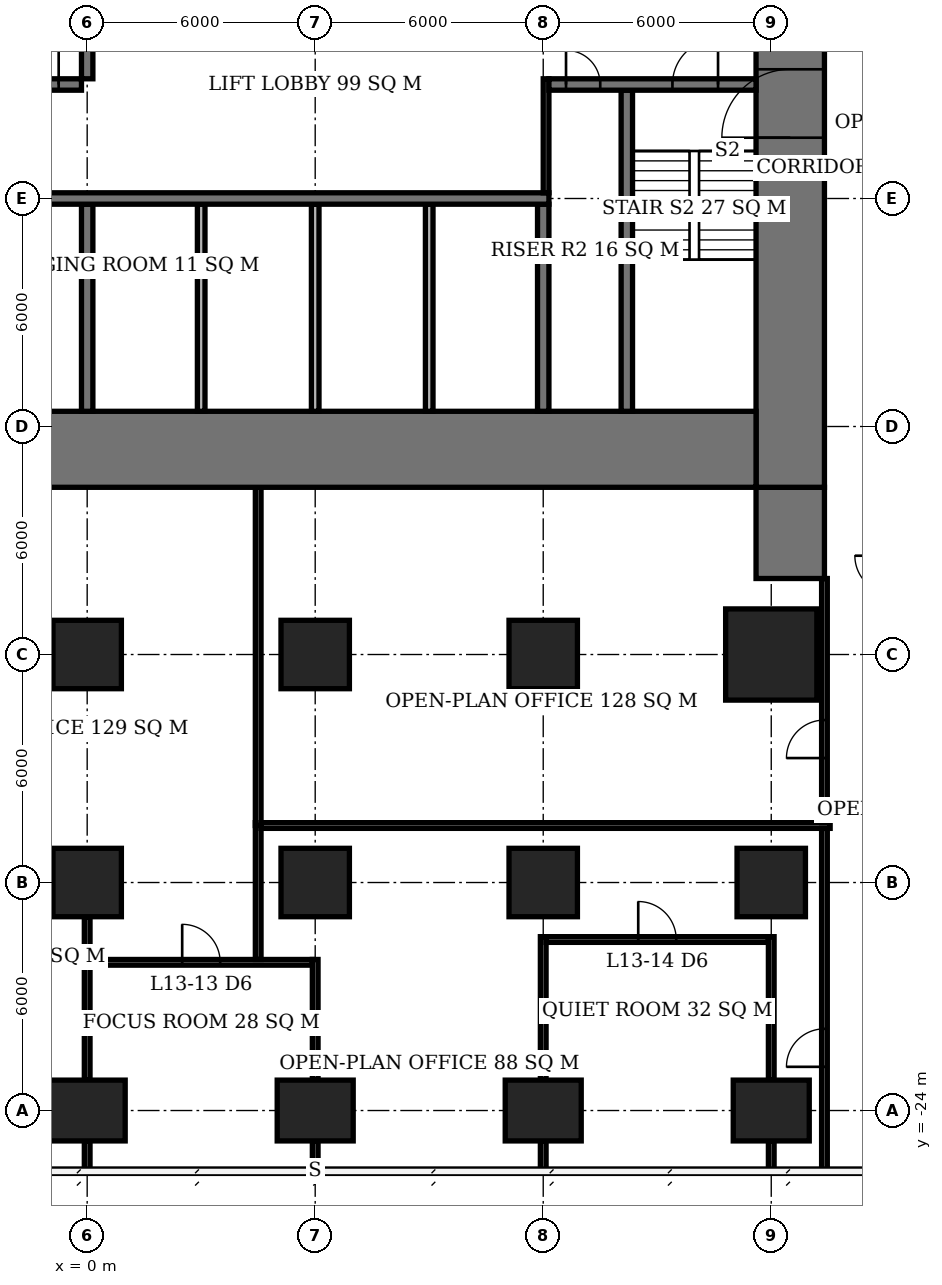
"""IFC4 building model, lengths in metres.
Left out: names, types, materials, properties, quantities, classifications, styles, units other than length and angle.
Written with IfcOpenShell. Run it as: python <this file> out.ifc"""

import sys

from ifc_helpers import new_model, si_unit, direction, frame, frame_2d, origin, origin_2d, place, context, subcontext, project, spatial, rectangle, extrude, element, fill, save


model = new_model("IFC4")
c1 = context("Model", 3, precision=1e-05, world=origin(), true_north=direction((0.0, 1.0)))
c2 = subcontext(c1, "Body", "Model", "MODEL_VIEW")
j1 = project(units=[si_unit("LENGTHUNIT", "METRE"), si_unit("PLANEANGLEUNIT", "RADIAN")], contexts=[c1])
p1 = place(None, origin())
s1 = spatial("IfcSite", under=j1, at=p1, CompositionType="ELEMENT")
p2 = place(p1, origin())
s2 = spatial("IfcBuilding", under=s1, at=p2, CompositionType="ELEMENT")
p3 = place(p2, frame((0.0, 0.0, 57.2)))
s3 = spatial("IfcBuildingStorey", under=s2, at=p3, CompositionType="ELEMENT", Elevation=57.2)
p4 = place(p3, frame((0.0, -24.0, 0.0), z_axis=(0.0, 0.0, 1.0), x_axis=(1.0, 0.0, 0.0)))
e1 = element("IfcColumn", 1, at=p4, inside=s3, PredefinedType="COLUMN", context=c2, shape_type="SweptSolid", body=[
    extrude(rectangle(XDim=2.0, YDim=1.6, at=origin_2d()), origin(), (0.0, 0.0, 1.0), 3.9),
])
for number, where, z_axis, x_axis in (
    (2, (0.0, -18.0, 0.0), (0.0, 0.0, 1.0), (1.0, 0.0, 0.0)),
    (3, (0.0, -12.0, 0.0), (0.0, 0.0, 1.0), (1.0, 0.0, 0.0)),
):
    element("IfcColumn", number, at=place(p3, frame(where, z_axis=z_axis, x_axis=x_axis)), inside=s3, PredefinedType="COLUMN", context=c2, shape_type="SweptSolid", body=[
        extrude(rectangle(XDim=1.8, YDim=1.8, at=origin_2d()), origin(), (0.0, 0.0, 1.0), 3.9),
    ])
p5 = place(p3, frame((6.0, -24.0, 0.0), z_axis=(0.0, 0.0, 1.0), x_axis=(1.0, 0.0, 0.0)))
e4 = element("IfcColumn", 4, at=p5, inside=s3, PredefinedType="COLUMN", context=c2, shape_type="SweptSolid", body=[
    extrude(rectangle(XDim=2.0, YDim=1.6, at=origin_2d()), origin(), (0.0, 0.0, 1.0), 3.9),
])
for number, where, z_axis, x_axis in (
    (5, (6.0, -18.0, 0.0), (0.0, 0.0, 1.0), (1.0, 0.0, 0.0)),
    (6, (6.0, -12.0, 0.0), (0.0, 0.0, 1.0), (1.0, 0.0, 0.0)),
):
    element("IfcColumn", number, at=place(p3, frame(where, z_axis=z_axis, x_axis=x_axis)), inside=s3, PredefinedType="COLUMN", context=c2, shape_type="SweptSolid", body=[
        extrude(rectangle(XDim=1.8, YDim=1.8, at=origin_2d()), origin(), (0.0, 0.0, 1.0), 3.9),
    ])
p6 = place(p3, frame((12.0, -24.0, 0.0), z_axis=(0.0, 0.0, 1.0), x_axis=(1.0, 0.0, 0.0)))
e7 = element("IfcColumn", 7, at=p6, inside=s3, PredefinedType="COLUMN", context=c2, shape_type="SweptSolid", body=[
    extrude(rectangle(XDim=2.0, YDim=1.6, at=origin_2d()), origin(), (0.0, 0.0, 1.0), 3.9),
])
for number, where, z_axis, x_axis in (
    (8, (12.0, -18.0, 0.0), (0.0, 0.0, 1.0), (1.0, 0.0, 0.0)),
    (9, (12.0, -12.0, 0.0), (0.0, 0.0, 1.0), (1.0, 0.0, 0.0)),
):
    element("IfcColumn", number, at=place(p3, frame(where, z_axis=z_axis, x_axis=x_axis)), inside=s3, PredefinedType="COLUMN", context=c2, shape_type="SweptSolid", body=[
        extrude(rectangle(XDim=1.8, YDim=1.8, at=origin_2d()), origin(), (0.0, 0.0, 1.0), 3.9),
    ])
p7 = place(p3, frame((18.0, -24.0, 0.0), z_axis=(0.0, 0.0, 1.0), x_axis=(1.0, 0.0, 0.0)))
e10 = element("IfcColumn", 10, at=p7, inside=s3, PredefinedType="COLUMN", context=c2, shape_type="SweptSolid", body=[
    extrude(rectangle(XDim=2.0, YDim=1.6, at=origin_2d()), origin(), (0.0, 0.0, 1.0), 3.9),
])
p8 = place(p3, frame((18.0, -18.0, 0.0), z_axis=(0.0, 0.0, 1.0), x_axis=(1.0, 0.0, 0.0)))
e11 = element("IfcColumn", 11, at=p8, inside=s3, PredefinedType="COLUMN", context=c2, shape_type="SweptSolid", body=[
    extrude(rectangle(XDim=1.8, YDim=1.8, at=origin_2d()), origin(), (0.0, 0.0, 1.0), 3.9),
])
p9 = place(p3, frame((18.0, -12.0, 0.0), z_axis=(0.0, 0.0, 1.0), x_axis=(1.0, 0.0, 0.0)))
e12 = element("IfcColumn", 12, at=p9, inside=s3, PredefinedType="COLUMN", context=c2, shape_type="SweptSolid", body=[
    extrude(rectangle(XDim=2.4, YDim=2.4, at=origin_2d()), origin(), (0.0, 0.0, 1.0), 3.9),
])
p10 = place(p3, frame((-5.6, -6.6, 0.0), z_axis=(0.0, 0.0, 1.0), x_axis=(1.0, 0.0, 0.0)))
e13 = element("IfcWall", 13, at=p10, inside=s3, PredefinedType="SHEAR", context=c2, shape_type="SweptSolid", body=[
    extrude(rectangle(XDim=23.2, YDim=2.0, at=frame_2d((11.6, 0.0))), origin(), (0.0, 0.0, 1.0), 3.9),
])
p11 = place(p3, frame((18.5, -7.6, 0.0), z_axis=(0.0, 0.0, 1.0), x_axis=(0.0, 1.0, 0.0)))
e14 = element("IfcWall", 14, at=p11, inside=s3, PredefinedType="SHEAR", context=c2, shape_type="SweptSolid", body=[
    extrude(rectangle(XDim=21.2, YDim=1.8, at=frame_2d((10.6, 0.0))), origin(), (0.0, 0.0, 1.0), 3.9),
])
p12 = place(p11, frame((9.2, 0.0, 0.0)))
e15 = element("IfcOpeningElement", 15, at=p12, cuts=e14, PredefinedType="OPENING", context=c2, shape_type="SweptSolid", body=[
    extrude(rectangle(XDim=1.8, YDim=2.4, at=frame_2d((0.9, 1.2))), frame((0.0, 0.91, 0.0), z_axis=(0.0, -1.0, 0.0), x_axis=(1.0, 0.0, 0.0)), (0.0, 0.0, 1.0), 1.82),
])
p13 = place(p3, frame((18.5, -10.0, 0.0), z_axis=(0.0, 0.0, 1.0), x_axis=(0.0, 1.0, 0.0)))
e16 = element("IfcWall", 16, at=p13, inside=s3, PredefinedType="SHEAR", context=c2, shape_type="SweptSolid", body=[
    extrude(rectangle(XDim=2.4, YDim=1.8, at=frame_2d((1.2, 0.0))), origin(), (0.0, 0.0, 1.0), 3.9),
])
p14 = place(p3, frame((-5.6, 0.0, 0.0), z_axis=(0.0, 0.0, 1.0), x_axis=(1.0, 0.0, 0.0)))
e17 = element("IfcWall", 17, at=p14, inside=s3, PredefinedType="SHEAR", context=c2, shape_type="SweptSolid", body=[
    extrude(rectangle(XDim=17.75, YDim=0.3, at=frame_2d((8.875, 0.0))), origin(), (0.0, 0.0, 1.0), 3.9),
])
p15 = place(p14, frame((0.6, 0.0, 0.0)))
e18 = element("IfcOpeningElement", 18, at=p15, cuts=e17, PredefinedType="OPENING", context=c2, shape_type="SweptSolid", body=[
    extrude(rectangle(XDim=0.9, YDim=2.1, at=frame_2d((0.45, 1.05))), frame((0.0, 0.16, 0.0), z_axis=(0.0, -1.0, 0.0), x_axis=(1.0, 0.0, 0.0)), (0.0, 0.0, 1.0), 0.32),
])
p16 = place(p14, frame((3.7, 0.0, 0.0)))
e19 = element("IfcOpeningElement", 19, at=p16, cuts=e17, PredefinedType="OPENING", context=c2, shape_type="SweptSolid", body=[
    extrude(rectangle(XDim=0.9, YDim=2.1, at=frame_2d((0.45, 1.05))), frame((0.0, 0.16, 0.0), z_axis=(0.0, -1.0, 0.0), x_axis=(1.0, 0.0, 0.0)), (0.0, 0.0, 1.0), 0.32),
])
p17 = place(p3, frame((-5.6, 3.0, 0.0), z_axis=(0.0, 0.0, 1.0), x_axis=(1.0, 0.0, 0.0)))
e20 = element("IfcWall", 20, at=p17, inside=s3, PredefinedType="SHEAR", context=c2, shape_type="SweptSolid", body=[
    extrude(rectangle(XDim=5.45, YDim=0.3, at=frame_2d((2.725, 0.0))), origin(), (0.0, 0.0, 1.0), 3.9),
])
p18 = place(p17, frame((0.4, 0.0, 0.0)))
e21 = element("IfcOpeningElement", 21, at=p18, cuts=e20, PredefinedType="OPENING", context=c2, shape_type="SweptSolid", body=[
    extrude(rectangle(XDim=1.2, YDim=2.1, at=frame_2d((0.6, 1.05))), frame((0.0, 0.16, 0.0), z_axis=(0.0, -1.0, 0.0), x_axis=(1.0, 0.0, 0.0)), (0.0, 0.0, 1.0), 0.32),
])
p19 = place(p17, frame((3.95, 0.0, 0.0)))
e22 = element("IfcOpeningElement", 22, at=p19, cuts=e20, PredefinedType="OPENING", context=c2, shape_type="SweptSolid", body=[
    extrude(rectangle(XDim=0.9, YDim=2.1, at=frame_2d((0.45, 1.05))), frame((0.0, 0.16, 0.0), z_axis=(0.0, -1.0, 0.0), x_axis=(1.0, 0.0, 0.0)), (0.0, 0.0, 1.0), 0.32),
])
p20 = place(p3, frame((12.15, 3.0, 0.0), z_axis=(0.0, 0.0, 1.0), x_axis=(1.0, 0.0, 0.0)))
e23 = element("IfcWall", 23, at=p20, inside=s3, PredefinedType="SHEAR", context=c2, shape_type="SweptSolid", body=[
    extrude(rectangle(XDim=5.45, YDim=0.3, at=frame_2d((2.725, 0.0))), origin(), (0.0, 0.0, 1.0), 3.9),
])
p21 = place(p20, frame((3.25, 0.0, 0.0)))
e24 = element("IfcOpeningElement", 24, at=p21, cuts=e23, PredefinedType="OPENING", context=c2, shape_type="SweptSolid", body=[
    extrude(rectangle(XDim=1.2, YDim=2.1, at=frame_2d((0.6, 1.05))), frame((0.0, 0.16, 0.0), z_axis=(0.0, -1.0, 0.0), x_axis=(1.0, 0.0, 0.0)), (0.0, 0.0, 1.0), 0.32),
])
p22 = place(p20, frame((0.45, 0.0, 0.0)))
e25 = element("IfcOpeningElement", 25, at=p22, cuts=e23, PredefinedType="OPENING", context=c2, shape_type="SweptSolid", body=[
    extrude(rectangle(XDim=0.9, YDim=2.1, at=frame_2d((0.45, 1.05))), frame((0.0, 0.16, 0.0), z_axis=(0.0, -1.0, 0.0), x_axis=(1.0, 0.0, 0.0)), (0.0, 0.0, 1.0), 0.32),
])
p23 = place(p3, frame((0.0, -5.6, 0.0), z_axis=(0.0, 0.0, 1.0), x_axis=(0.0, 1.0, 0.0)))
e26 = element("IfcWall", 26, at=p23, inside=s3, PredefinedType="SHEAR", context=c2, shape_type="SweptSolid", body=[
    extrude(rectangle(XDim=5.45, YDim=0.3, at=frame_2d((2.725, 0.0))), origin(), (0.0, 0.0, 1.0), 3.9),
])
p24 = place(p3, frame((0.0, 3.15, 0.0), z_axis=(0.0, 0.0, 1.0), x_axis=(0.0, 1.0, 0.0)))
e27 = element("IfcWall", 27, at=p24, inside=s3, PredefinedType="SHEAR", context=c2, shape_type="SweptSolid", body=[
    extrude(rectangle(XDim=8.45, YDim=0.3, at=frame_2d((4.225, 0.0))), origin(), (0.0, 0.0, 1.0), 3.9),
])
p25 = place(p3, frame((12.0, -5.6, 0.0), z_axis=(0.0, 0.0, 1.0), x_axis=(0.0, 1.0, 0.0)))
e28 = element("IfcWall", 28, at=p25, inside=s3, PredefinedType="SHEAR", context=c2, shape_type="SweptSolid", body=[
    extrude(rectangle(XDim=5.45, YDim=0.3, at=frame_2d((2.725, 0.0))), origin(), (0.0, 0.0, 1.0), 3.9),
])
p26 = place(p3, frame((14.2, -5.6, 0.0), z_axis=(0.0, 0.0, 1.0), x_axis=(0.0, 1.0, 0.0)))
e29 = element("IfcWall", 29, at=p26, inside=s3, PredefinedType="SHEAR", context=c2, shape_type="SweptSolid", body=[
    extrude(rectangle(XDim=8.45, YDim=0.3, at=frame_2d((4.225, 0.0))), origin(), (0.0, 0.0, 1.0), 3.9),
])
for number, where, z_axis, x_axis in (
    (30, (3.0, -5.6, 0.0), (0.0, 0.0, 1.0), (0.0, 1.0, 0.0)),
    (31, (6.0, -5.6, 0.0), (0.0, 0.0, 1.0), (0.0, 1.0, 0.0)),
    (32, (9.0, -5.6, 0.0), (0.0, 0.0, 1.0), (0.0, 1.0, 0.0)),
):
    element("IfcWall", number, at=place(p3, frame(where, z_axis=z_axis, x_axis=x_axis)), inside=s3, PredefinedType="SOLIDWALL", context=c2, shape_type="SweptSolid", body=[
        extrude(rectangle(XDim=5.45, YDim=0.2, at=frame_2d((2.725, 0.0))), origin(), (0.0, 0.0, 1.0), 3.9),
    ])
p27 = place(p3, frame((0.075, -20.1, 0.0), z_axis=(0.0, 0.0, 1.0), x_axis=(1.0, 0.0, 0.0)))
e33 = element("IfcWall", 33, at=p27, inside=s3, PredefinedType="PARTITIONING", context=c2, shape_type="SweptSolid", body=[
    extrude(rectangle(XDim=5.85, YDim=0.15, at=frame_2d((2.925, 0.0))), origin(), (0.0, 0.0, 1.0), 3.65),
])
p28 = place(p27, frame((2.425, 0.0, 0.0)))
e34 = element("IfcOpeningElement", 34, at=p28, cuts=e33, PredefinedType="OPENING", context=c2, shape_type="SweptSolid", body=[
    extrude(rectangle(XDim=1.0, YDim=2.1, at=frame_2d((0.5, 1.05))), frame((0.0, 0.085, 0.0), z_axis=(0.0, -1.0, 0.0), x_axis=(1.0, 0.0, 0.0)), (0.0, 0.0, 1.0), 0.17),
])
p29 = place(p3, frame((12.075, -19.5, 0.0), z_axis=(0.0, 0.0, 1.0), x_axis=(1.0, 0.0, 0.0)))
e35 = element("IfcWall", 35, at=p29, inside=s3, PredefinedType="PARTITIONING", context=c2, shape_type="SweptSolid", body=[
    extrude(rectangle(XDim=5.85, YDim=0.15, at=frame_2d((2.925, 0.0))), origin(), (0.0, 0.0, 1.0), 3.65),
])
p30 = place(p29, frame((2.425, 0.0, 0.0)))
e36 = element("IfcOpeningElement", 36, at=p30, cuts=e35, PredefinedType="OPENING", context=c2, shape_type="SweptSolid", body=[
    extrude(rectangle(XDim=1.0, YDim=2.1, at=frame_2d((0.5, 1.05))), frame((0.0, 0.085, 0.0), z_axis=(0.0, -1.0, 0.0), x_axis=(1.0, 0.0, 0.0)), (0.0, 0.0, 1.0), 0.17),
])
p31 = place(p3, frame((-5.1, -18.0, 0.0), z_axis=(0.0, 0.0, 1.0), x_axis=(1.0, 0.0, 0.0)))
e37 = element("IfcWall", 37, at=p31, inside=s3, PredefinedType="PARTITIONING", context=c2, shape_type="SweptSolid", body=[
    extrude(rectangle(XDim=4.2, YDim=0.15, at=frame_2d((2.1, 0.0))), origin(), (0.0, 0.0, 1.0), 3.65),
])
p32 = place(p31, frame((1.6, 0.0, 0.0)))
e38 = element("IfcOpeningElement", 38, at=p32, cuts=e37, PredefinedType="OPENING", context=c2, shape_type="SweptSolid", body=[
    extrude(rectangle(XDim=1.0, YDim=2.1, at=frame_2d((0.5, 1.05))), frame((0.0, 0.085, 0.0), z_axis=(0.0, -1.0, 0.0), x_axis=(1.0, 0.0, 0.0)), (0.0, 0.0, 1.0), 0.17),
])
p33 = place(p3, frame((0.0, -25.6, 0.0), z_axis=(0.0, 0.0, 1.0), x_axis=(0.0, 1.0, 0.0)))
e39 = element("IfcWall", 39, at=p33, inside=s3, PredefinedType="PARTITIONING", context=c2, shape_type="SweptSolid", body=[
    extrude(rectangle(XDim=0.8, YDim=0.15, at=frame_2d((0.4, 0.0))), origin(), (0.0, 0.0, 1.0), 3.65),
])
p34 = place(p3, frame((0.0, -23.2, 0.0), z_axis=(0.0, 0.0, 1.0), x_axis=(0.0, 1.0, 0.0)))
e40 = element("IfcWall", 40, at=p34, inside=s3, PredefinedType="PARTITIONING", context=c2, shape_type="SweptSolid", body=[
    extrude(rectangle(XDim=3.175, YDim=0.15, at=frame_2d((1.587, 0.0))), origin(), (0.0, 0.0, 1.0), 3.65),
])
p35 = place(p3, frame((0.0, -20.025, 0.0), z_axis=(0.0, 0.0, 1.0), x_axis=(0.0, 1.0, 0.0)))
e41 = element("IfcWall", 41, at=p35, inside=s3, PredefinedType="PARTITIONING", context=c2, shape_type="SweptSolid", body=[
    extrude(rectangle(XDim=1.125, YDim=0.15, at=frame_2d((0.562, 0.0))), origin(), (0.0, 0.0, 1.0), 3.65),
])
p36 = place(p3, frame((6.0, -25.55, 0.0), z_axis=(0.0, 0.0, 1.0), x_axis=(0.0, 1.0, 0.0)))
e42 = element("IfcWall", 42, at=p36, inside=s3, PredefinedType="PARTITIONING", context=c2, shape_type="SweptSolid", body=[
    extrude(rectangle(XDim=0.75, YDim=0.15, at=frame_2d((0.375, 0.0))), origin(), (0.0, 0.0, 1.0), 3.65),
])
p37 = place(p3, frame((6.0, -23.2, 0.0), z_axis=(0.0, 0.0, 1.0), x_axis=(0.0, 1.0, 0.0)))
e43 = element("IfcWall", 43, at=p37, inside=s3, PredefinedType="PARTITIONING", context=c2, shape_type="SweptSolid", body=[
    extrude(rectangle(XDim=3.175, YDim=0.15, at=frame_2d((1.587, 0.0))), origin(), (0.0, 0.0, 1.0), 3.65),
])
p38 = place(p3, frame((12.0, -25.6, 0.0), z_axis=(0.0, 0.0, 1.0), x_axis=(0.0, 1.0, 0.0)))
e44 = element("IfcWall", 44, at=p38, inside=s3, PredefinedType="PARTITIONING", context=c2, shape_type="SweptSolid", body=[
    extrude(rectangle(XDim=0.8, YDim=0.15, at=frame_2d((0.4, 0.0))), origin(), (0.0, 0.0, 1.0), 3.65),
])
p39 = place(p3, frame((12.0, -23.2, 0.0), z_axis=(0.0, 0.0, 1.0), x_axis=(0.0, 1.0, 0.0)))
e45 = element("IfcWall", 45, at=p39, inside=s3, PredefinedType="PARTITIONING", context=c2, shape_type="SweptSolid", body=[
    extrude(rectangle(XDim=3.775, YDim=0.15, at=frame_2d((1.887, 0.0))), origin(), (0.0, 0.0, 1.0), 3.65),
])
p40 = place(p3, frame((18.0, -25.6, 0.0), z_axis=(0.0, 0.0, 1.0), x_axis=(0.0, 1.0, 0.0)))
e46 = element("IfcWall", 46, at=p40, inside=s3, PredefinedType="PARTITIONING", context=c2, shape_type="SweptSolid", body=[
    extrude(rectangle(XDim=0.8, YDim=0.15, at=frame_2d((0.4, 0.0))), origin(), (0.0, 0.0, 1.0), 3.65),
])
p41 = place(p3, frame((18.0, -23.2, 0.0), z_axis=(0.0, 0.0, 1.0), x_axis=(0.0, 1.0, 0.0)))
e47 = element("IfcWall", 47, at=p41, inside=s3, PredefinedType="PARTITIONING", context=c2, shape_type="SweptSolid", body=[
    extrude(rectangle(XDim=3.775, YDim=0.15, at=frame_2d((1.887, 0.0))), origin(), (0.0, 0.0, 1.0), 3.65),
])
p42 = place(p3, frame((4.5, -20.025, 0.0), z_axis=(0.0, 0.0, 1.0), x_axis=(0.0, 1.0, 0.0)))
e48 = element("IfcWall", 48, at=p42, inside=s3, PredefinedType="PARTITIONING", context=c2, shape_type="SweptSolid", body=[
    extrude(rectangle(XDim=3.6, YDim=0.15, at=frame_2d((1.8, 0.0))), origin(), (0.0, 0.0, 1.0), 3.65),
])
p43 = place(p3, frame((4.5, -16.5, 0.0), z_axis=(0.0, 0.0, 1.0), x_axis=(0.0, 1.0, 0.0)))
e49 = element("IfcWall", 49, at=p43, inside=s3, PredefinedType="PARTITIONING", context=c2, shape_type="SweptSolid", body=[
    extrude(rectangle(XDim=8.9, YDim=0.15, at=frame_2d((4.45, 0.0))), origin(), (0.0, 0.0, 1.0), 3.65),
])
p44 = place(p3, frame((4.575, -16.5, 0.0), z_axis=(0.0, 0.0, 1.0), x_axis=(1.0, 0.0, 0.0)))
e50 = element("IfcWall", 50, at=p44, inside=s3, PredefinedType="PARTITIONING", context=c2, shape_type="SweptSolid", body=[
    extrude(rectangle(XDim=14.975, YDim=0.15, at=frame_2d((7.488, 0.0))), origin(), (0.0, 0.0, 1.0), 3.65),
])
p45 = place(p3, frame((19.4, -25.6, 0.0), z_axis=(0.0, 0.0, 1.0), x_axis=(0.0, 1.0, 0.0)))
e51 = element("IfcWall", 51, at=p45, inside=s3, PredefinedType="PARTITIONING", context=c2, shape_type="SweptSolid", body=[
    extrude(rectangle(XDim=9.025, YDim=0.15, at=frame_2d((4.513, 0.0))), origin(), (0.0, 0.0, 1.0), 3.65),
])
p46 = place(p45, frame((2.75, 0.0, 0.0)))
e52 = element("IfcOpeningElement", 52, at=p46, cuts=e51, PredefinedType="OPENING", context=c2, shape_type="SweptSolid", body=[
    extrude(rectangle(XDim=1.0, YDim=2.1, at=frame_2d((0.5, 1.05))), frame((0.0, 0.085, 0.0), z_axis=(0.0, -1.0, 0.0), x_axis=(1.0, 0.0, 0.0)), (0.0, 0.0, 1.0), 0.17),
])
p47 = place(p3, frame((19.4, -16.425, 0.0), z_axis=(0.0, 0.0, 1.0), x_axis=(0.0, 1.0, 0.0)))
e53 = element("IfcWall", 53, at=p47, inside=s3, PredefinedType="PARTITIONING", context=c2, shape_type="SweptSolid", body=[
    extrude(rectangle(XDim=6.425, YDim=0.15, at=frame_2d((3.212, 0.0))), origin(), (0.0, 0.0, 1.0), 3.65),
])
p48 = place(p47, frame((1.7, 0.0, 0.0)))
e54 = element("IfcOpeningElement", 54, at=p48, cuts=e53, PredefinedType="OPENING", context=c2, shape_type="SweptSolid", body=[
    extrude(rectangle(XDim=1.0, YDim=2.1, at=frame_2d((0.5, 1.05))), frame((0.0, 0.085, 0.0), z_axis=(0.0, -1.0, 0.0), x_axis=(1.0, 0.0, 0.0)), (0.0, 0.0, 1.0), 0.17),
])
p49 = place(p3, frame((12.075, 0.15, 0.0), z_axis=(0.0, 0.0, 1.0), x_axis=(0.0, 1.0, 0.0)))
e55 = element("IfcWall", 55, at=p49, inside=s3, PredefinedType="PARTITIONING", context=c2, shape_type="SweptSolid", body=[
    extrude(rectangle(XDim=3.0, YDim=0.15, at=frame_2d((1.5, 0.0))), origin(), (0.0, 0.0, 1.0), 3.65),
])
p50 = place(p12, origin())
e56 = element("IfcDoor", 56, at=p50, inside=s3, OperationType="DOUBLE_DOOR_SINGLE_SWING", PredefinedType="DOOR", context=c2, shape_type="SweptSolid", body=[
    extrude(rectangle(XDim=1.8, YDim=2.4, at=frame_2d((0.9, 1.2))), frame((0.0, 0.025, 0.0), z_axis=(0.0, -1.0, 0.0), x_axis=(1.0, 0.0, 0.0)), (0.0, 0.0, 1.0), 0.05),
])
fill(e15, e56)
p51 = place(p19, origin())
e57 = element("IfcDoor", 57, at=p51, inside=s3, OperationType="SINGLE_SWING_RIGHT", PredefinedType="DOOR", context=c2, shape_type="SweptSolid", body=[
    extrude(rectangle(XDim=0.9, YDim=2.1, at=frame_2d((0.45, 1.05))), frame((0.0, 0.025, 0.0), z_axis=(0.0, -1.0, 0.0), x_axis=(1.0, 0.0, 0.0)), (0.0, 0.0, 1.0), 0.05),
])
fill(e22, e57)
p52 = place(p21, origin())
e58 = element("IfcDoor", 58, at=p52, inside=s3, OperationType="SINGLE_SWING_RIGHT", PredefinedType="DOOR", context=c2, shape_type="SweptSolid", body=[
    extrude(rectangle(XDim=1.2, YDim=2.1, at=frame_2d((0.6, 1.05))), frame((0.0, 0.025, 0.0), z_axis=(0.0, -1.0, 0.0), x_axis=(1.0, 0.0, 0.0)), (0.0, 0.0, 1.0), 0.05),
])
fill(e24, e58)
p53 = place(p22, origin())
e59 = element("IfcDoor", 59, at=p53, inside=s3, OperationType="SINGLE_SWING_LEFT", PredefinedType="DOOR", context=c2, shape_type="SweptSolid", body=[
    extrude(rectangle(XDim=0.9, YDim=2.1, at=frame_2d((0.45, 1.05))), frame((0.0, 0.025, 0.0), z_axis=(0.0, -1.0, 0.0), x_axis=(1.0, 0.0, 0.0)), (0.0, 0.0, 1.0), 0.05),
])
fill(e25, e59)
p54 = place(p28, origin())
e60 = element("IfcDoor", 60, at=p54, inside=s3, OperationType="SINGLE_SWING_LEFT", PredefinedType="DOOR", context=c2, shape_type="SweptSolid", body=[
    extrude(rectangle(XDim=1.0, YDim=2.1, at=frame_2d((0.5, 1.05))), frame((0.0, 0.025, 0.0), z_axis=(0.0, -1.0, 0.0), x_axis=(1.0, 0.0, 0.0)), (0.0, 0.0, 1.0), 0.05),
])
fill(e34, e60)
p55 = place(p30, origin())
e61 = element("IfcDoor", 61, at=p55, inside=s3, OperationType="SINGLE_SWING_LEFT", PredefinedType="DOOR", context=c2, shape_type="SweptSolid", body=[
    extrude(rectangle(XDim=1.0, YDim=2.1, at=frame_2d((0.5, 1.05))), frame((0.0, 0.025, 0.0), z_axis=(0.0, -1.0, 0.0), x_axis=(1.0, 0.0, 0.0)), (0.0, 0.0, 1.0), 0.05),
])
fill(e36, e61)
p56 = place(p46, origin())
e62 = element("IfcDoor", 62, at=p56, inside=s3, OperationType="SINGLE_SWING_LEFT", PredefinedType="DOOR", context=c2, shape_type="SweptSolid", body=[
    extrude(rectangle(XDim=1.0, YDim=2.1, at=frame_2d((0.5, 1.05))), frame((0.0, 0.025, 0.0), z_axis=(0.0, -1.0, 0.0), x_axis=(1.0, 0.0, 0.0)), (0.0, 0.0, 1.0), 0.05),
])
fill(e52, e62)
p57 = place(p48, origin())
e63 = element("IfcDoor", 63, at=p57, inside=s3, OperationType="SINGLE_SWING_LEFT", PredefinedType="DOOR", context=c2, shape_type="SweptSolid", body=[
    extrude(rectangle(XDim=1.0, YDim=2.1, at=frame_2d((0.5, 1.05))), frame((0.0, 0.025, 0.0), z_axis=(0.0, -1.0, 0.0), x_axis=(1.0, 0.0, 0.0)), (0.0, 0.0, 1.0), 0.05),
])
fill(e54, e63)
save(model, sys.argv[1])
